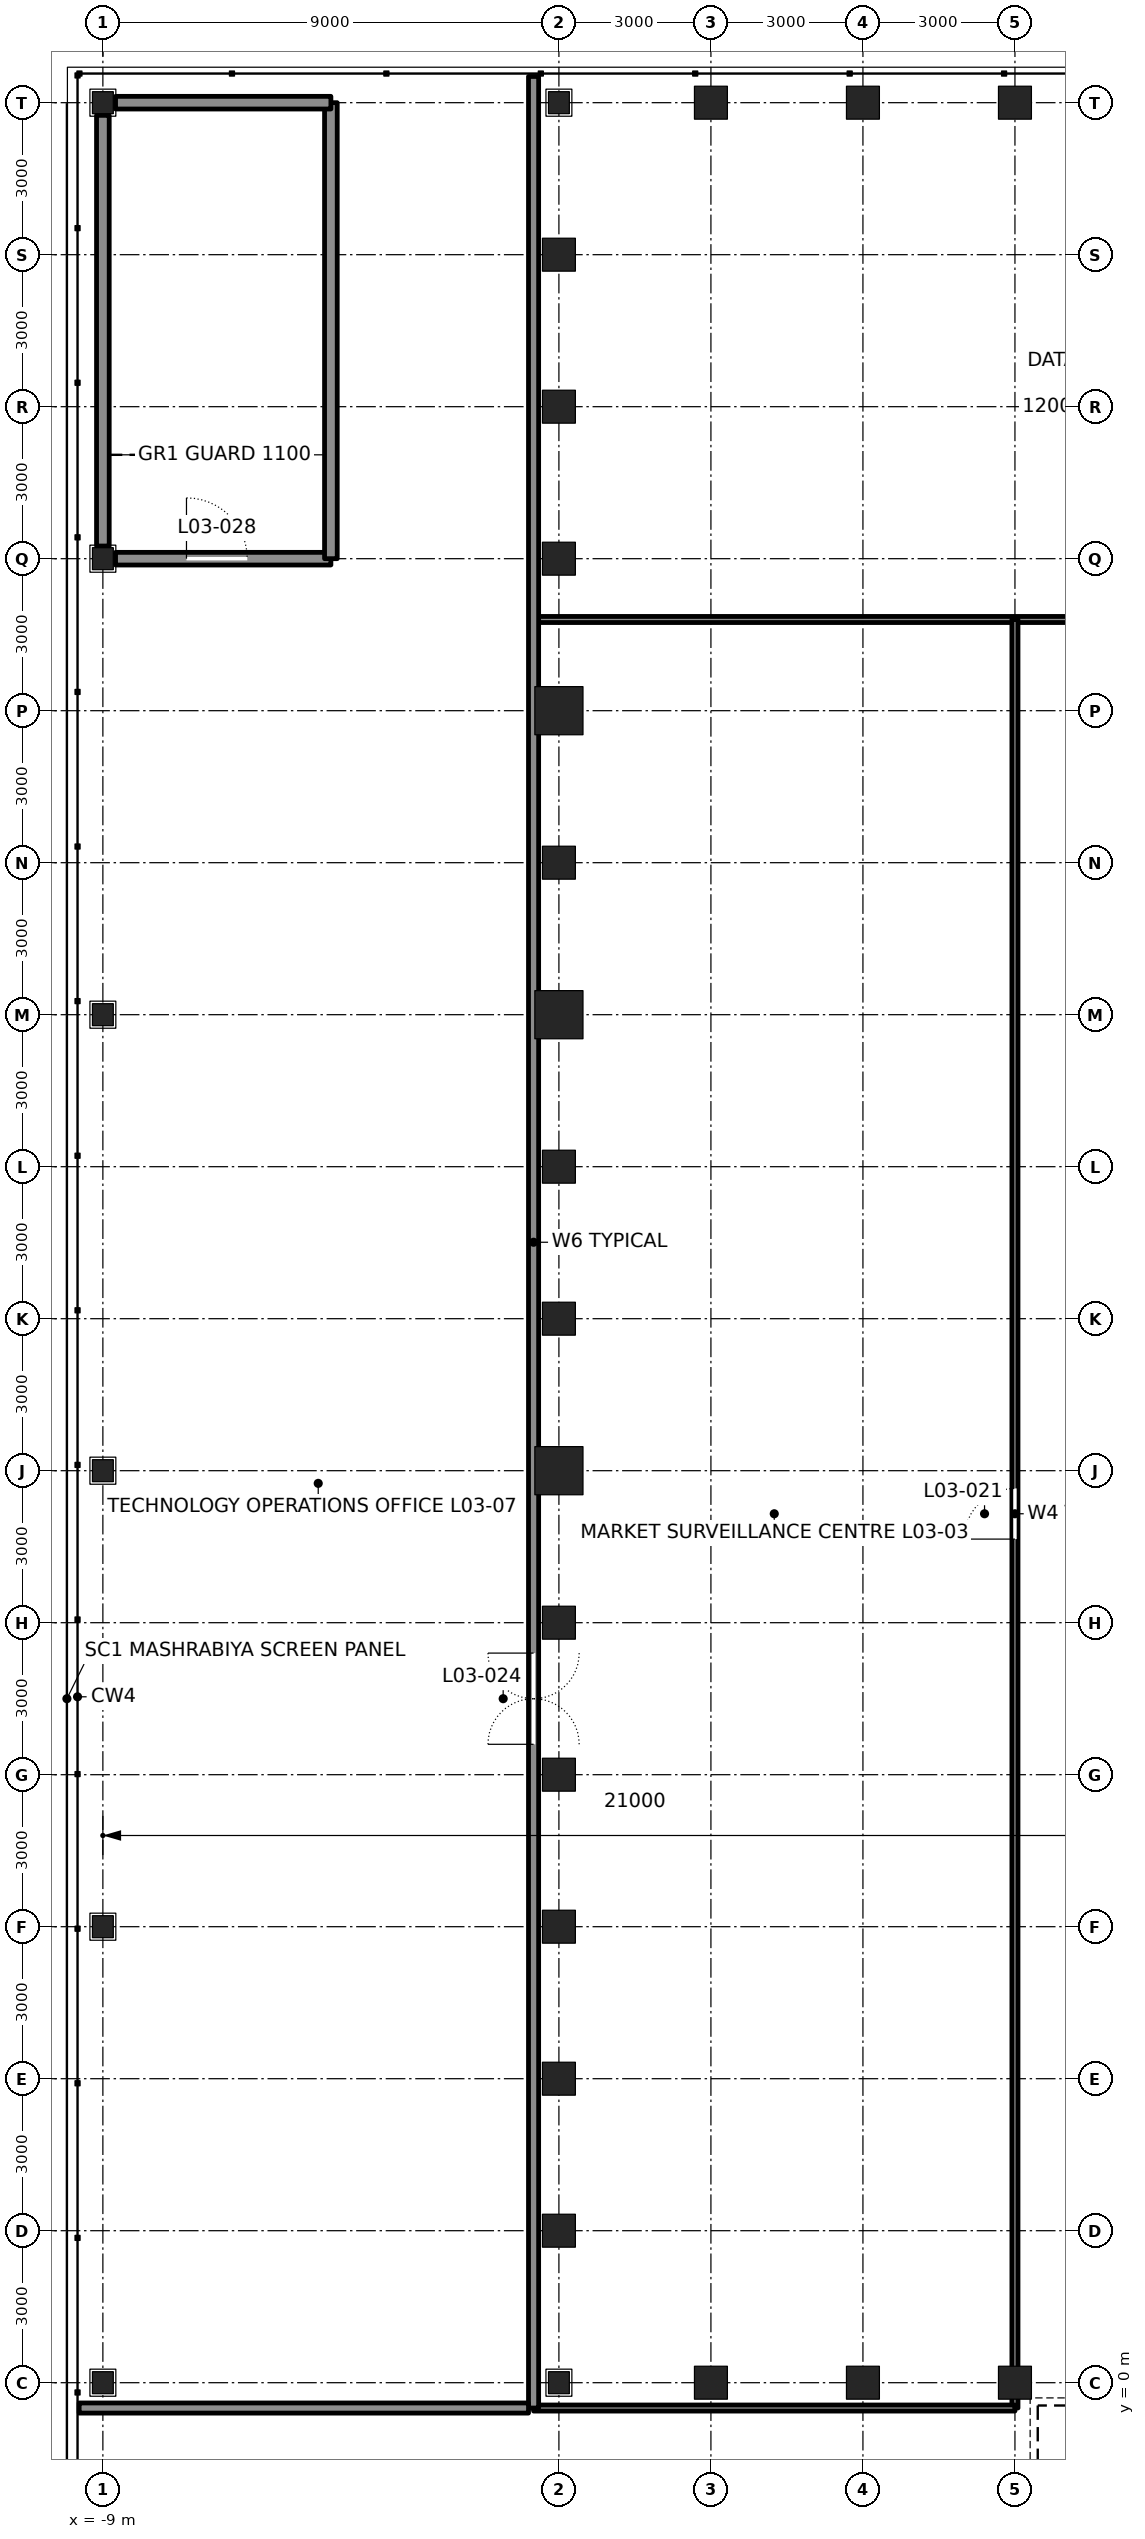
"""IFC4 building model, lengths in metres.
Left out: names, types, materials, properties, quantities, classifications, styles, units other than length and angle.
Written with IfcOpenShell. Run it as: python <this file> out.ifc"""

import sys

from ifc_helpers import new_model, si_unit, direction, frame, frame_2d, origin, origin_2d, place, context, subcontext, project, spatial, rectangle, hollow_rectangle, i_section, extrude, element, fill, save


model = new_model("IFC4")
c1 = context("Model", 3, precision=1e-05, world=origin(), true_north=direction((0.0, 1.0)))
c2 = subcontext(c1, "Body", "Model", "MODEL_VIEW")
j1 = project(units=[si_unit("LENGTHUNIT", "METRE"), si_unit("PLANEANGLEUNIT", "RADIAN")], contexts=[c1])
p1 = place(None, origin())
s1 = spatial("IfcSite", under=j1, at=p1, CompositionType="ELEMENT")
p2 = place(p1, origin())
s2 = spatial("IfcBuilding", under=s1, at=p2, CompositionType="ELEMENT")
p3 = place(p2, frame((0.0, 0.0, 19.5)))
s3 = spatial("IfcBuildingStorey", under=s2, at=p3, CompositionType="ELEMENT", Elevation=19.5)
for number, where, z_axis, x_axis in (
    (1, (3.0, 0.0, 0.0), (0.0, 0.0, 1.0), (0.0, -1.0, 0.0)),
    (2, (6.0, 0.0, 0.0), (0.0, 0.0, 1.0), (0.0, -1.0, 0.0)),
    (3, (9.0, 0.0, 0.0), (0.0, 0.0, 1.0), (0.0, -1.0, 0.0)),
    (4, (9.0, 45.0, 0.0), (0.0, 0.0, 1.0), (0.0, 1.0, 0.0)),
    (5, (6.0, 45.0, 0.0), (0.0, 0.0, 1.0), (0.0, 1.0, 0.0)),
    (6, (3.0, 45.0, 0.0), (0.0, 0.0, 1.0), (0.0, 1.0, 0.0)),
    (7, (0.0, 42.0, 0.0), (0.0, 0.0, 1.0), (-1.0, 0.0, 0.0)),
    (8, (0.0, 39.0, 0.0), (0.0, 0.0, 1.0), (-1.0, 0.0, 0.0)),
    (9, (0.0, 36.0, 0.0), (0.0, 0.0, 1.0), (-1.0, 0.0, 0.0)),
):
    element("IfcColumn", number, at=place(p3, frame(where, z_axis=z_axis, x_axis=x_axis)), inside=s3, PredefinedType="COLUMN", context=c2, shape_type="SweptSolid", body=[
        extrude(hollow_rectangle(XDim=0.65, YDim=0.65, WallThickness=0.065, at=origin_2d()), origin(), (0.0, 0.0, 1.0), 4.8),
    ])
p4 = place(p3, frame((0.0, 33.0, 0.0), z_axis=(0.0, 0.0, 1.0), x_axis=(-1.0, 0.0, 0.0)))
e10 = element("IfcColumn", 10, at=p4, inside=s3, PredefinedType="COLUMN", context=c2, shape_type="SweptSolid", body=[
    extrude(hollow_rectangle(XDim=0.95, YDim=0.95, WallThickness=0.11, at=origin_2d()), origin(), (0.0, 0.0, 1.0), 4.8),
])
p5 = place(p3, frame((0.0, 30.0, 0.0), z_axis=(0.0, 0.0, 1.0), x_axis=(-1.0, 0.0, 0.0)))
e11 = element("IfcColumn", 11, at=p5, inside=s3, PredefinedType="COLUMN", context=c2, shape_type="SweptSolid", body=[
    extrude(hollow_rectangle(XDim=0.65, YDim=0.65, WallThickness=0.065, at=origin_2d()), origin(), (0.0, 0.0, 1.0), 4.8),
])
p6 = place(p3, frame((0.0, 27.0, 0.0), z_axis=(0.0, 0.0, 1.0), x_axis=(-1.0, 0.0, 0.0)))
e12 = element("IfcColumn", 12, at=p6, inside=s3, PredefinedType="COLUMN", context=c2, shape_type="SweptSolid", body=[
    extrude(hollow_rectangle(XDim=0.95, YDim=0.95, WallThickness=0.11, at=origin_2d()), origin(), (0.0, 0.0, 1.0), 4.8),
])
for number, where, z_axis, x_axis in (
    (13, (0.0, 24.0, 0.0), (0.0, 0.0, 1.0), (-1.0, 0.0, 0.0)),
    (14, (0.0, 21.0, 0.0), (0.0, 0.0, 1.0), (-1.0, 0.0, 0.0)),
):
    element("IfcColumn", number, at=place(p3, frame(where, z_axis=z_axis, x_axis=x_axis)), inside=s3, PredefinedType="COLUMN", context=c2, shape_type="SweptSolid", body=[
        extrude(hollow_rectangle(XDim=0.65, YDim=0.65, WallThickness=0.065, at=origin_2d()), origin(), (0.0, 0.0, 1.0), 4.8),
    ])
p7 = place(p3, frame((0.0, 18.0, 0.0), z_axis=(0.0, 0.0, 1.0), x_axis=(-1.0, 0.0, 0.0)))
e15 = element("IfcColumn", 15, at=p7, inside=s3, PredefinedType="COLUMN", context=c2, shape_type="SweptSolid", body=[
    extrude(hollow_rectangle(XDim=0.95, YDim=0.95, WallThickness=0.11, at=origin_2d()), origin(), (0.0, 0.0, 1.0), 4.8),
])
for number, where, z_axis, x_axis in (
    (16, (0.0, 15.0, 0.0), (0.0, 0.0, 1.0), (-1.0, 0.0, 0.0)),
    (17, (0.0, 12.0, 0.0), (0.0, 0.0, 1.0), (-1.0, 0.0, 0.0)),
    (18, (0.0, 9.0, 0.0), (0.0, 0.0, 1.0), (-1.0, 0.0, 0.0)),
    (19, (0.0, 6.0, 0.0), (0.0, 0.0, 1.0), (-1.0, 0.0, 0.0)),
    (20, (0.0, 3.0, 0.0), (0.0, 0.0, 1.0), (-1.0, 0.0, 0.0)),
):
    element("IfcColumn", number, at=place(p3, frame(where, z_axis=z_axis, x_axis=x_axis)), inside=s3, PredefinedType="COLUMN", context=c2, shape_type="SweptSolid", body=[
        extrude(hollow_rectangle(XDim=0.65, YDim=0.65, WallThickness=0.065, at=origin_2d()), origin(), (0.0, 0.0, 1.0), 4.8),
    ])
for number, where, z_axis, x_axis in (
    (21, (-9.0, 0.0, 0.0), (0.0, 0.0, 1.0), (1.0, 0.0, 0.0)),
    (22, (-9.0, 9.0, 0.0), (0.0, 0.0, 1.0), (1.0, 0.0, 0.0)),
    (23, (-9.0, 18.0, 0.0), (0.0, 0.0, 1.0), (1.0, 0.0, 0.0)),
    (24, (-9.0, 27.0, 0.0), (0.0, 0.0, 1.0), (1.0, 0.0, 0.0)),
    (25, (-9.0, 36.0, 0.0), (0.0, 0.0, 1.0), (1.0, 0.0, 0.0)),
    (26, (-9.0, 45.0, 0.0), (0.0, 0.0, 1.0), (1.0, 0.0, 0.0)),
    (27, (0.0, 0.0, 0.0), (0.0, 0.0, 1.0), (1.0, 0.0, 0.0)),
    (28, (0.0, 45.0, 0.0), (0.0, 0.0, 1.0), (1.0, 0.0, 0.0)),
):
    element("IfcColumn", number, at=place(p3, frame(where, z_axis=z_axis, x_axis=x_axis)), inside=s3, PredefinedType="COLUMN", context=c2, shape_type="SweptSolid", body=[
        extrude(i_section(OverallWidth=0.411, OverallDepth=0.434, WebThickness=0.036, FlangeThickness=0.057, at=origin_2d()), origin(), (0.0, 0.0, 1.0), 4.8),
    ])
p8 = place(p3, frame((-0.5, 34.8, 0.0), z_axis=(0.0, 0.0, 1.0), x_axis=(1.0, 0.0, 0.0)))
e29 = element("IfcWall", 29, at=p8, inside=s3, PredefinedType="PARTITIONING", context=c2, shape_type="SweptSolid", body=[
    extrude(rectangle(XDim=23.0, YDim=0.12, at=frame_2d((11.5, 0.0))), origin(), (0.0, 0.0, 1.0), 4.34),
])
p9 = place(p8, frame((11.0, 0.0, 0.0)))
e30 = element("IfcOpeningElement", 30, at=p9, cuts=e29, PredefinedType="OPENING", context=c2, shape_type="SweptSolid", body=[
    extrude(rectangle(XDim=1.0, YDim=2.4, at=frame_2d((0.5, 1.2))), frame((0.0, 0.07, 0.0), z_axis=(0.0, -1.0, 0.0), x_axis=(1.0, 0.0, 0.0)), (0.0, 0.0, 1.0), 0.14),
])
p10 = place(p3, frame((9.0, -0.5, 0.0), z_axis=(0.0, 0.0, 1.0), x_axis=(0.0, 1.0, 0.0)))
e31 = element("IfcWall", 31, at=p10, inside=s3, PredefinedType="PARTITIONING", context=c2, shape_type="SweptSolid", body=[
    extrude(rectangle(XDim=35.3, YDim=0.12, at=frame_2d((17.65, 0.0))), origin(), (0.0, 0.0, 1.0), 3.653),
])
p11 = place(p10, frame((17.15, 0.0, 0.0)))
e32 = element("IfcOpeningElement", 32, at=p11, cuts=e31, PredefinedType="OPENING", context=c2, shape_type="SweptSolid", body=[
    extrude(rectangle(XDim=1.0, YDim=2.4, at=frame_2d((0.5, 1.2))), frame((0.0, 0.07, 0.0), z_axis=(0.0, -1.0, 0.0), x_axis=(1.0, 0.0, 0.0)), (0.0, 0.0, 1.0), 0.14),
])
p12 = place(p3, frame((-0.5, -0.5, 0.0), z_axis=(0.0, 0.0, 1.0), x_axis=(1.0, 0.0, 0.0)))
e33 = element("IfcWall", 33, at=p12, inside=s3, PredefinedType="PARTITIONING", context=c2, shape_type="SweptSolid", body=[
    extrude(rectangle(XDim=9.5, YDim=0.12, at=frame_2d((4.75, 0.0))), origin(), (0.0, 0.0, 1.0), 4.34),
])
p13 = place(p3, frame((-0.5, -0.5, 0.0), z_axis=(0.0, 0.0, 1.0), x_axis=(0.0, 1.0, 0.0)))
e34 = element("IfcWall", 34, at=p13, inside=s3, PredefinedType="PARTITIONING", context=c2, shape_type="SweptSolid", body=[
    extrude(rectangle(XDim=46.018, YDim=0.2, at=frame_2d((23.009, 0.0))), origin(), (0.0, 0.0, 1.0), 4.64),
])
p14 = place(p13, frame((13.1, 0.0, 0.0)))
e35 = element("IfcOpeningElement", 35, at=p14, cuts=e34, PredefinedType="OPENING", context=c2, shape_type="SweptSolid", body=[
    extrude(rectangle(XDim=1.8, YDim=2.4, at=frame_2d((0.9, 1.2))), frame((0.0, 0.11, 0.0), z_axis=(0.0, -1.0, 0.0), x_axis=(1.0, 0.0, 0.0)), (0.0, 0.0, 1.0), 0.22),
])
p15 = place(p3, frame((-9.468, -0.5, 0.0), z_axis=(0.0, 0.0, 1.0), x_axis=(1.0, 0.0, 0.0)))
e36 = element("IfcWall", 36, at=p15, inside=s3, PredefinedType="PARTITIONING", context=c2, shape_type="SweptSolid", body=[
    extrude(rectangle(XDim=8.868, YDim=0.2, at=frame_2d((4.434, 0.0))), origin(), (0.0, 0.0, 1.0), 4.64),
])
p16 = place(p3, frame((-8.75, 36.0, 0.0), z_axis=(0.0, 0.0, 1.0), x_axis=(1.0, 0.0, 0.0)))
e37 = element("IfcWall", 37, at=p16, inside=s3, PredefinedType="SOLIDWALL", context=c2, shape_type="SweptSolid", body=[
    extrude(rectangle(XDim=4.25, YDim=0.25, at=frame_2d((2.125, 0.0))), origin(), (0.0, 0.0, 1.0), 3.653),
])
p17 = place(p16, frame((1.4, 0.0, 0.0)))
e38 = element("IfcOpeningElement", 38, at=p17, cuts=e37, PredefinedType="OPENING", context=c2, shape_type="SweptSolid", body=[
    extrude(rectangle(XDim=1.2, YDim=2.1, at=frame_2d((0.6, 1.05))), frame((0.0, 0.135, 0.0), z_axis=(0.0, -1.0, 0.0), x_axis=(1.0, 0.0, 0.0)), (0.0, 0.0, 1.0), 0.27),
])
p18 = place(p3, frame((-4.5, 36.0, 0.0), z_axis=(0.0, 0.0, 1.0), x_axis=(0.0, 1.0, 0.0)))
e39 = element("IfcWall", 39, at=p18, inside=s3, PredefinedType="SOLIDWALL", context=c2, shape_type="SweptSolid", body=[
    extrude(rectangle(XDim=9.0, YDim=0.25, at=frame_2d((4.5, 0.0))), origin(), (0.0, 0.0, 1.0), 4.64),
])
p19 = place(p3, frame((-8.75, 45.0, 0.0), z_axis=(0.0, 0.0, 1.0), x_axis=(1.0, 0.0, 0.0)))
e40 = element("IfcWall", 40, at=p19, inside=s3, PredefinedType="SOLIDWALL", context=c2, shape_type="SweptSolid", body=[
    extrude(rectangle(XDim=4.25, YDim=0.25, at=frame_2d((2.125, 0.0))), origin(), (0.0, 0.0, 1.0), 3.653),
])
p20 = place(p3, frame((-9.0, 36.25, 0.0), z_axis=(0.0, 0.0, 1.0), x_axis=(0.0, 1.0, 0.0)))
e41 = element("IfcWall", 41, at=p20, inside=s3, PredefinedType="SOLIDWALL", context=c2, shape_type="SweptSolid", body=[
    extrude(rectangle(XDim=8.5, YDim=0.25, at=frame_2d((4.25, 0.0))), origin(), (0.0, 0.0, 1.0), 3.653),
])
p21 = place(p11, origin())
e42 = element("IfcDoor", 42, at=p21, inside=s3, OperationType="SINGLE_SWING_LEFT", PredefinedType="DOOR", context=c2, shape_type="SweptSolid", body=[
    extrude(rectangle(XDim=1.0, YDim=2.4, at=frame_2d((0.5, 1.2))), frame((0.0, 0.025, 0.0), z_axis=(0.0, -1.0, 0.0), x_axis=(1.0, 0.0, 0.0)), (0.0, 0.0, 1.0), 0.05),
])
fill(e32, e42)
p22 = place(p14, origin())
e43 = element("IfcDoor", 43, at=p22, inside=s3, OperationType="DOUBLE_DOOR_DOUBLE_SWING", PredefinedType="DOOR", context=c2, shape_type="SweptSolid", body=[
    extrude(rectangle(XDim=1.8, YDim=2.4, at=frame_2d((0.9, 1.2))), frame((0.0, 0.025, 0.0), z_axis=(0.0, -1.0, 0.0), x_axis=(1.0, 0.0, 0.0)), (0.0, 0.0, 1.0), 0.05),
])
fill(e35, e43)
p23 = place(p17, origin())
e44 = element("IfcDoor", 44, at=p23, inside=s3, OperationType="SINGLE_SWING_LEFT", PredefinedType="DOOR", context=c2, shape_type="SweptSolid", body=[
    extrude(rectangle(XDim=1.2, YDim=2.1, at=frame_2d((0.6, 1.05))), frame((0.0, 0.025, 0.0), z_axis=(0.0, -1.0, 0.0), x_axis=(1.0, 0.0, 0.0)), (0.0, 0.0, 1.0), 0.05),
])
fill(e38, e44)
save(model, sys.argv[1])
